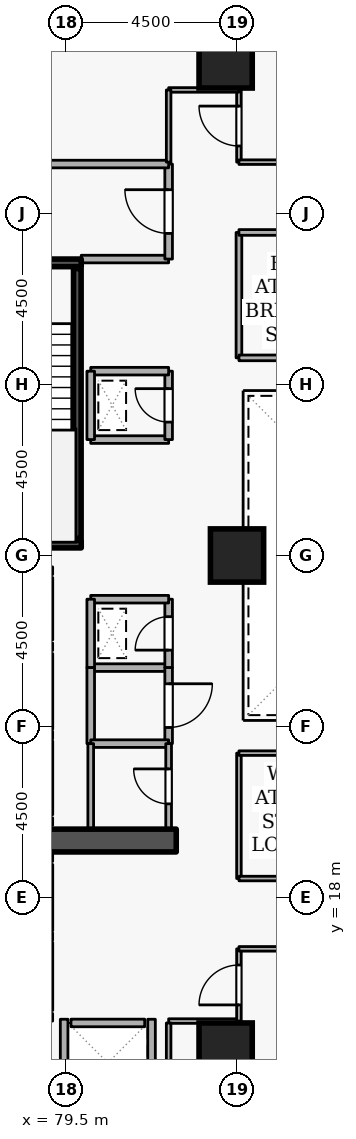
"""IFC4 building model, lengths in metres.
Left out: names, types, materials, properties, quantities, classifications, styles, units other than length and angle.
Written with IfcOpenShell. Run it as: python <this file> out.ifc"""

import sys

from ifc_helpers import new_model, si_unit, direction, frame, frame_2d, origin, origin_2d, place, context, subcontext, project, spatial, rectangle, extrude, element, fill, save


model = new_model("IFC4")
c1 = context("Model", 3, precision=1e-05, world=origin(), true_north=direction((0.0, 1.0)))
c2 = subcontext(c1, "Body", "Model", "MODEL_VIEW")
j1 = project(units=[si_unit("LENGTHUNIT", "METRE"), si_unit("PLANEANGLEUNIT", "RADIAN")], contexts=[c1])
p1 = place(None, origin())
s1 = spatial("IfcSite", under=j1, at=p1, CompositionType="ELEMENT")
p2 = place(p1, origin())
s2 = spatial("IfcBuilding", under=s1, at=p2, CompositionType="ELEMENT")
p3 = place(p2, frame((0.0, 0.0, 38.7)))
s3 = spatial("IfcBuildingStorey", under=s2, at=p3, CompositionType="ELEMENT", Elevation=38.7)
p4 = place(p3, frame((76.7, 19.5, 0.0), z_axis=(0.0, 0.0, 1.0), x_axis=(1.0, 0.0, 0.0)))
e1 = element("IfcWall", 1, at=p4, inside=s3, PredefinedType="SHEAR", context=c2, shape_type="SweptSolid", body=[
    extrude(rectangle(XDim=5.7, YDim=0.6, at=frame_2d((2.85, 0.0))), origin(), (0.0, 0.0, 1.0), 3.6),
])
for number, where, z_axis, x_axis in (
    (2, (83.7, 14.0, 0.0), (0.0, 0.0, 1.0), (1.0, 0.0, 0.0)),
    (3, (83.7, 40.0, 0.0), (0.0, 0.0, 1.0), (1.0, 0.0, 0.0)),
    (4, (84.0, 27.0, 0.0), (0.0, 0.0, 1.0), (1.0, 0.0, 0.0)),
):
    element("IfcColumn", number, at=place(p3, frame(where, z_axis=z_axis, x_axis=x_axis)), inside=s3, PredefinedType="COLUMN", context=c2, shape_type="SweptSolid", body=[
        extrude(rectangle(XDim=1.4, YDim=1.4, at=origin_2d()), origin(), (0.0, 0.0, 1.0), 3.6),
    ])
p5 = place(p3, frame((79.05, 24.78, 0.0), z_axis=(0.0, 0.0, 1.0), x_axis=(0.0, 1.0, 0.0)))
e5 = element("IfcWall", 5, at=p5, inside=s3, PredefinedType="STANDARD", context=c2, shape_type="SweptSolid", body=[
    extrude(rectangle(XDim=1.64, YDim=0.2, at=frame_2d((0.82, 0.0))), origin(), (0.0, 0.0, 1.0), 3.34),
])
p6 = place(p5, frame((0.31, 0.0, 0.0)))
e6 = element("IfcOpeningElement", 6, at=p6, cuts=e5, PredefinedType="OPENING", context=c2, shape_type="SweptSolid", body=[
    extrude(rectangle(XDim=1.02, YDim=2.06, at=frame_2d((0.51, 1.03))), frame((0.0, 0.11, 0.0), z_axis=(0.0, -1.0, 0.0), x_axis=(1.0, 0.0, 0.0)), (0.0, 0.0, 1.0), 0.22),
])
p7 = place(p3, frame((79.05, 22.43, 0.0), z_axis=(0.0, 0.0, 1.0), x_axis=(0.0, 1.0, 0.0)))
e7 = element("IfcWall", 7, at=p7, inside=s3, PredefinedType="STANDARD", context=c2, shape_type="SweptSolid", body=[
    extrude(rectangle(XDim=1.99, YDim=0.2, at=frame_2d((0.995, 0.0))), origin(), (0.0, 0.0, 1.0), 3.34),
])
p8 = place(p3, frame((79.05, 20.18, 0.0), z_axis=(0.0, 0.0, 1.0), x_axis=(0.0, 1.0, 0.0)))
e8 = element("IfcWall", 8, at=p8, inside=s3, PredefinedType="STANDARD", context=c2, shape_type="SweptSolid", body=[
    extrude(rectangle(XDim=1.94, YDim=0.2, at=frame_2d((0.97, 0.0))), origin(), (0.0, 0.0, 1.0), 3.34),
])
p9 = place(p3, frame((79.05, 17.13, 0.0), z_axis=(0.0, 0.0, 1.0), x_axis=(0.0, 1.0, 0.0)))
e9 = element("IfcWall", 9, at=p9, inside=s3, PredefinedType="STANDARD", context=c2, shape_type="SweptSolid", body=[
    extrude(rectangle(XDim=1.74, YDim=0.2, at=frame_2d((0.87, 0.0))), origin(), (0.0, 0.0, 1.0), 3.34),
])
p10 = place(p3, frame((79.05, 15.03, 0.0), z_axis=(0.0, 0.0, 1.0), x_axis=(0.0, 1.0, 0.0)))
e10 = element("IfcWall", 10, at=p10, inside=s3, PredefinedType="STANDARD", context=c2, shape_type="SweptSolid", body=[
    extrude(rectangle(XDim=1.79, YDim=0.2, at=frame_2d((0.895, 0.0))), origin(), (0.0, 0.0, 1.0), 3.34),
])
p11 = place(p3, frame((79.63, 14.7, 0.0), z_axis=(0.0, 0.0, 1.0), x_axis=(1.0, 0.0, 0.0)))
e11 = element("IfcWall", 11, at=p11, inside=s3, PredefinedType="STANDARD", context=c2, shape_type="SweptSolid", body=[
    extrude(rectangle(XDim=1.94, YDim=0.2, at=frame_2d((0.97, 0.0))), origin(), (0.0, 0.0, 1.0), 3.34),
])
for number, where, z_axis, x_axis in (
    (12, (81.75, 12.612, 0.0), (0.0, 0.0, 1.0), (0.0, 1.0, 0.0)),
    (13, (79.45, 12.612, 0.0), (0.0, 0.0, 1.0), (0.0, 1.0, 0.0)),
):
    element("IfcWall", number, at=place(p3, frame(where, z_axis=z_axis, x_axis=x_axis)), inside=s3, PredefinedType="STANDARD", context=c2, shape_type="SweptSolid", body=[
        extrude(rectangle(XDim=2.186, YDim=0.2, at=frame_2d((1.093, 0.0))), origin(), (0.0, 0.0, 1.0), 3.34),
    ])
p12 = place(p3, frame((76.55, 34.7, 0.0), z_axis=(0.0, 0.0, 1.0), x_axis=(1.0, 0.0, 0.0)))
e14 = element("IfcWall", 14, at=p12, inside=s3, PredefinedType="SHEAR", context=c2, shape_type="SweptSolid", body=[
    extrude(rectangle(XDim=3.35, YDim=0.2, at=frame_2d((1.675, 0.0))), origin(), (0.0, 0.0, 1.0), 3.6),
])
p13 = place(p12, frame((1.125, 0.0, 0.0)))
e15 = element("IfcOpeningElement", 15, at=p13, cuts=e14, PredefinedType="OPENING", context=c2, shape_type="SweptSolid", body=[
    extrude(rectangle(XDim=1.1, YDim=2.1, at=frame_2d((0.55, 1.05))), frame((0.0, 0.11, 0.0), z_axis=(0.0, -1.0, 0.0), x_axis=(1.0, 0.0, 0.0)), (0.0, 0.0, 1.0), 0.22),
])
p14 = place(p3, frame((79.9, 27.3, 0.0), z_axis=(0.0, 0.0, 1.0), x_axis=(-1.0, 0.0, 0.0)))
e16 = element("IfcWall", 16, at=p14, inside=s3, PredefinedType="SHEAR", context=c2, shape_type="SweptSolid", body=[
    extrude(rectangle(XDim=3.35, YDim=0.2, at=frame_2d((1.675, 0.0))), origin(), (0.0, 0.0, 1.0), 3.6),
])
p15 = place(p3, frame((79.797, 27.45, 0.0), z_axis=(0.0, 0.0, 1.0), x_axis=(0.0, 1.0, 0.0)))
e17 = element("IfcWall", 17, at=p15, inside=s3, PredefinedType="SHEAR", context=c2, shape_type="SweptSolid", body=[
    extrude(rectangle(XDim=7.1, YDim=0.2, at=frame_2d((3.55, 0.0))), origin(), (0.0, 0.0, 1.0), 3.6),
])
p16 = place(p3, frame((79.9, 34.8, 0.0), z_axis=(0.0, 0.0, 1.0), x_axis=(1.0, 0.0, 0.0)))
e18 = element("IfcWall", 18, at=p16, inside=s3, PredefinedType="STANDARD", context=c2, shape_type="SweptSolid", body=[
    extrude(rectangle(XDim=2.3, YDim=0.2, at=frame_2d((1.15, 0.0))), origin(), (0.0, 0.0, 1.0), 2.545),
])
p17 = place(p3, frame((82.2, 34.8, 0.0), z_axis=(0.0, 0.0, 1.0), x_axis=(0.0, 1.0, 0.0)))
e19 = element("IfcWall", 19, at=p17, inside=s3, PredefinedType="STANDARD", context=c2, shape_type="SweptSolid", body=[
    extrude(rectangle(XDim=2.5, YDim=0.2, at=frame_2d((1.25, 0.0))), origin(), (0.0, 0.0, 1.0), 3.34),
])
p18 = place(p17, frame((0.675, 0.0, 0.0)))
e20 = element("IfcOpeningElement", 20, at=p18, cuts=e19, PredefinedType="OPENING", context=c2, shape_type="SweptSolid", body=[
    extrude(rectangle(XDim=1.15, YDim=2.1, at=frame_2d((0.575, 1.05))), frame((0.0, 0.11, 0.0), z_axis=(0.0, -1.0, 0.0), x_axis=(1.0, 0.0, 0.0)), (0.0, 0.0, 1.0), 0.22),
])
p19 = place(p3, frame((82.2, 37.3, 0.0), z_axis=(0.0, 0.0, 1.0), x_axis=(-1.0, 0.0, 0.0)))
e21 = element("IfcWall", 21, at=p19, inside=s3, PredefinedType="STANDARD", context=c2, shape_type="SweptSolid", body=[
    extrude(rectangle(XDim=5.7, YDim=0.2, at=frame_2d((2.85, 0.0))), origin(), (0.0, 0.0, 1.0), 3.34),
])
p20 = place(p3, frame((80.15, 24.05, 0.0), z_axis=(0.0, 0.0, 1.0), x_axis=(1.0, 0.0, 0.0)))
e22 = element("IfcWall", 22, at=p20, inside=s3, PredefinedType="STANDARD", context=c2, shape_type="SweptSolid", body=[
    extrude(rectangle(XDim=2.05, YDim=0.2, at=frame_2d((1.025, 0.0))), origin(), (0.0, 0.0, 1.0), 3.34),
])
p21 = place(p3, frame((82.2, 24.05, 0.0), z_axis=(0.0, 0.0, 1.0), x_axis=(0.0, 1.0, 0.0)))
e23 = element("IfcWall", 23, at=p21, inside=s3, PredefinedType="STANDARD", context=c2, shape_type="SweptSolid", body=[
    extrude(rectangle(XDim=1.8, YDim=0.2, at=frame_2d((0.9, 0.0))), origin(), (0.0, 0.0, 1.0), 3.34),
])
p22 = place(p21, frame((0.46, 0.0, 0.0)))
e24 = element("IfcOpeningElement", 24, at=p22, cuts=e23, PredefinedType="OPENING", context=c2, shape_type="SweptSolid", body=[
    extrude(rectangle(XDim=0.88, YDim=2.04, at=frame_2d((0.44, 1.02))), frame((0.0, 0.11, 0.0), z_axis=(0.0, -1.0, 0.0), x_axis=(1.0, 0.0, 0.0)), (0.0, 0.0, 1.0), 0.22),
])
p23 = place(p3, frame((82.2, 25.85, 0.0), z_axis=(0.0, 0.0, 1.0), x_axis=(-1.0, 0.0, 0.0)))
e25 = element("IfcWall", 25, at=p23, inside=s3, PredefinedType="STANDARD", context=c2, shape_type="SweptSolid", body=[
    extrude(rectangle(XDim=2.05, YDim=0.2, at=frame_2d((1.025, 0.0))), origin(), (0.0, 0.0, 1.0), 3.34),
])
p24 = place(p3, frame((80.15, 25.85, 0.0), z_axis=(0.0, 0.0, 1.0), x_axis=(0.0, -1.0, 0.0)))
e26 = element("IfcWall", 26, at=p24, inside=s3, PredefinedType="STANDARD", context=c2, shape_type="SweptSolid", body=[
    extrude(rectangle(XDim=1.8, YDim=0.2, at=frame_2d((0.9, 0.0))), origin(), (0.0, 0.0, 1.0), 3.34),
])
p25 = place(p3, frame((80.15, 30.05, 0.0), z_axis=(0.0, 0.0, 1.0), x_axis=(1.0, 0.0, 0.0)))
e27 = element("IfcWall", 27, at=p25, inside=s3, PredefinedType="STANDARD", context=c2, shape_type="SweptSolid", body=[
    extrude(rectangle(XDim=2.05, YDim=0.2, at=frame_2d((1.025, 0.0))), origin(), (0.0, 0.0, 1.0), 3.34),
])
p26 = place(p3, frame((82.2, 30.05, 0.0), z_axis=(0.0, 0.0, 1.0), x_axis=(0.0, 1.0, 0.0)))
e28 = element("IfcWall", 28, at=p26, inside=s3, PredefinedType="STANDARD", context=c2, shape_type="SweptSolid", body=[
    extrude(rectangle(XDim=1.8, YDim=0.2, at=frame_2d((0.9, 0.0))), origin(), (0.0, 0.0, 1.0), 3.34),
])
p27 = place(p26, frame((0.46, 0.0, 0.0)))
e29 = element("IfcOpeningElement", 29, at=p27, cuts=e28, PredefinedType="OPENING", context=c2, shape_type="SweptSolid", body=[
    extrude(rectangle(XDim=0.88, YDim=2.04, at=frame_2d((0.44, 1.02))), frame((0.0, 0.11, 0.0), z_axis=(0.0, -1.0, 0.0), x_axis=(1.0, 0.0, 0.0)), (0.0, 0.0, 1.0), 0.22),
])
p28 = place(p3, frame((82.2, 31.85, 0.0), z_axis=(0.0, 0.0, 1.0), x_axis=(-1.0, 0.0, 0.0)))
e30 = element("IfcWall", 30, at=p28, inside=s3, PredefinedType="STANDARD", context=c2, shape_type="SweptSolid", body=[
    extrude(rectangle(XDim=2.05, YDim=0.2, at=frame_2d((1.025, 0.0))), origin(), (0.0, 0.0, 1.0), 3.34),
])
p29 = place(p3, frame((80.15, 31.85, 0.0), z_axis=(0.0, 0.0, 1.0), x_axis=(0.0, -1.0, 0.0)))
e31 = element("IfcWall", 31, at=p29, inside=s3, PredefinedType="STANDARD", context=c2, shape_type="SweptSolid", body=[
    extrude(rectangle(XDim=1.8, YDim=0.2, at=frame_2d((0.9, 0.0))), origin(), (0.0, 0.0, 1.0), 3.34),
])
p30 = place(p3, frame((80.15, 22.05, 0.0), z_axis=(0.0, 0.0, 1.0), x_axis=(0.0, 1.0, 0.0)))
e32 = element("IfcWall", 32, at=p30, inside=s3, PredefinedType="STANDARD", context=c2, shape_type="SweptSolid", body=[
    extrude(rectangle(XDim=2.0, YDim=0.2, at=frame_2d((1.0, 0.0))), origin(), (0.0, 0.0, 1.0), 3.34),
])
p31 = place(p3, frame((82.2, 24.05, 0.0), z_axis=(0.0, 0.0, 1.0), x_axis=(0.0, -1.0, 0.0)))
e33 = element("IfcWall", 33, at=p31, inside=s3, PredefinedType="STANDARD", context=c2, shape_type="SweptSolid", body=[
    extrude(rectangle(XDim=2.0, YDim=0.2, at=frame_2d((1.0, 0.0))), origin(), (0.0, 0.0, 1.0), 3.34),
])
p32 = place(p31, frame((0.425, 0.0, 0.0)))
e34 = element("IfcOpeningElement", 34, at=p32, cuts=e33, PredefinedType="OPENING", context=c2, shape_type="SweptSolid", body=[
    extrude(rectangle(XDim=1.15, YDim=2.1, at=frame_2d((0.575, 1.05))), frame((0.0, 0.11, 0.0), z_axis=(0.0, -1.0, 0.0), x_axis=(1.0, 0.0, 0.0)), (0.0, 0.0, 1.0), 0.22),
])
p33 = place(p3, frame((82.2, 22.05, 0.0), z_axis=(0.0, 0.0, 1.0), x_axis=(-1.0, 0.0, 0.0)))
e35 = element("IfcWall", 35, at=p33, inside=s3, PredefinedType="STANDARD", context=c2, shape_type="SweptSolid", body=[
    extrude(rectangle(XDim=2.05, YDim=0.2, at=frame_2d((1.025, 0.0))), origin(), (0.0, 0.0, 1.0), 3.34),
])
p34 = place(p3, frame((82.2, 19.8, 0.0), z_axis=(0.0, 0.0, 1.0), x_axis=(0.0, 1.0, 0.0)))
e36 = element("IfcWall", 36, at=p34, inside=s3, PredefinedType="PARTITIONING", context=c2, shape_type="SweptSolid", body=[
    extrude(rectangle(XDim=2.25, YDim=0.15, at=frame_2d((1.125, 0.0))), origin(), (0.0, 0.0, 1.0), 3.34),
])
p35 = place(p34, frame((0.665, 0.0, 0.0)))
e37 = element("IfcOpeningElement", 37, at=p35, cuts=e36, PredefinedType="OPENING", context=c2, shape_type="SweptSolid", body=[
    extrude(rectangle(XDim=0.92, YDim=2.08, at=frame_2d((0.46, 1.04))), frame((0.0, 0.085, 0.0), z_axis=(0.0, -1.0, 0.0), x_axis=(1.0, 0.0, 0.0)), (0.0, 0.0, 1.0), 0.17),
])
p36 = place(p3, frame((80.15, 22.05, 0.0), z_axis=(0.0, 0.0, 1.0), x_axis=(0.0, -1.0, 0.0)))
e38 = element("IfcWall", 38, at=p36, inside=s3, PredefinedType="PARTITIONING", context=c2, shape_type="SweptSolid", body=[
    extrude(rectangle(XDim=2.25, YDim=0.15, at=frame_2d((1.125, 0.0))), origin(), (0.0, 0.0, 1.0), 3.34),
])
p37 = place(p3, frame((82.2, 14.75, 0.0), z_axis=(0.0, 0.0, 1.0), x_axis=(1.0, 0.0, 0.0)))
e39 = element("IfcWall", 39, at=p37, inside=s3, PredefinedType="PARTITIONING", context=c2, shape_type="SweptSolid", body=[
    extrude(rectangle(XDim=1.85, YDim=0.12, at=frame_2d((0.925, 0.0))), origin(), (0.0, 0.0, 1.0), 3.34),
])
p38 = place(p3, frame((84.05, 14.75, 0.0), z_axis=(0.0, 0.0, 1.0), x_axis=(0.0, 1.0, 0.0)))
e40 = element("IfcWall", 40, at=p38, inside=s3, PredefinedType="PARTITIONING", context=c2, shape_type="SweptSolid", body=[
    extrude(rectangle(XDim=1.9, YDim=0.12, at=frame_2d((0.95, 0.0))), origin(), (0.0, 0.0, 1.0), 3.34),
])
p39 = place(p38, frame((0.425, 0.0, 0.0)))
e41 = element("IfcOpeningElement", 41, at=p39, cuts=e40, PredefinedType="OPENING", context=c2, shape_type="SweptSolid", body=[
    extrude(rectangle(XDim=1.05, YDim=2.1, at=frame_2d((0.525, 1.05))), frame((0.0, 0.07, 0.0), z_axis=(0.0, -1.0, 0.0), x_axis=(1.0, 0.0, 0.0)), (0.0, 0.0, 1.0), 0.14),
])
p40 = place(p3, frame((84.05, 16.65, 0.0), z_axis=(0.0, 0.0, 1.0), x_axis=(1.0, 0.0, 0.0)))
e42 = element("IfcWall", 42, at=p40, inside=s3, PredefinedType="PARTITIONING", context=c2, shape_type="SweptSolid", body=[
    extrude(rectangle(XDim=1.3, YDim=0.12, at=frame_2d((0.65, 0.0))), origin(), (0.0, 0.0, 1.0), 3.34),
])
p41 = place(p3, frame((82.2, 12.4, 0.0), z_axis=(0.0, 0.0, 1.0), x_axis=(0.0, 1.0, 0.0)))
e43 = element("IfcWall", 43, at=p41, inside=s3, PredefinedType="PARTITIONING", context=c2, shape_type="SweptSolid", body=[
    extrude(rectangle(XDim=2.3, YDim=0.12, at=frame_2d((1.15, 0.0))), origin(), (0.0, 0.0, 1.0), 3.34),
])
p42 = place(p3, frame((84.05, 37.35, 0.0), z_axis=(0.0, 0.0, 1.0), x_axis=(0.0, 1.0, 0.0)))
e44 = element("IfcWall", 44, at=p42, inside=s3, PredefinedType="PARTITIONING", context=c2, shape_type="SweptSolid", body=[
    extrude(rectangle(XDim=1.9, YDim=0.12, at=frame_2d((0.95, 0.0))), origin(), (0.0, 0.0, 1.0), 3.34),
])
p43 = place(p42, frame((0.425, 0.0, 0.0)))
e45 = element("IfcOpeningElement", 45, at=p43, cuts=e44, PredefinedType="OPENING", context=c2, shape_type="SweptSolid", body=[
    extrude(rectangle(XDim=1.05, YDim=2.1, at=frame_2d((0.525, 1.05))), frame((0.0, 0.07, 0.0), z_axis=(0.0, -1.0, 0.0), x_axis=(1.0, 0.0, 0.0)), (0.0, 0.0, 1.0), 0.14),
])
p44 = place(p3, frame((84.05, 39.25, 0.0), z_axis=(0.0, 0.0, 1.0), x_axis=(-1.0, 0.0, 0.0)))
e46 = element("IfcWall", 46, at=p44, inside=s3, PredefinedType="PARTITIONING", context=c2, shape_type="SweptSolid", body=[
    extrude(rectangle(XDim=1.85, YDim=0.12, at=frame_2d((0.925, 0.0))), origin(), (0.0, 0.0, 1.0), 3.34),
])
p45 = place(p3, frame((82.2, 39.25, 0.0), z_axis=(0.0, 0.0, 1.0), x_axis=(0.0, -1.0, 0.0)))
e47 = element("IfcWall", 47, at=p45, inside=s3, PredefinedType="PARTITIONING", context=c2, shape_type="SweptSolid", body=[
    extrude(rectangle(XDim=1.9, YDim=0.12, at=frame_2d((0.95, 0.0))), origin(), (0.0, 0.0, 1.0), 3.34),
])
p46 = place(p3, frame((85.35, 37.35, 0.0), z_axis=(0.0, 0.0, 1.0), x_axis=(-1.0, 0.0, 0.0)))
e48 = element("IfcWall", 48, at=p46, inside=s3, PredefinedType="PARTITIONING", context=c2, shape_type="SweptSolid", body=[
    extrude(rectangle(XDim=1.3, YDim=0.12, at=frame_2d((0.65, 0.0))), origin(), (0.0, 0.0, 1.0), 3.34),
])
p47 = place(p3, frame((84.05, 32.2, 0.0), z_axis=(0.0, 0.0, 1.0), x_axis=(0.0, 1.0, 0.0)))
e49 = element("IfcWall", 49, at=p47, inside=s3, PredefinedType="PARTITIONING", context=c2, shape_type="SweptSolid", body=[
    extrude(rectangle(XDim=3.3, YDim=0.15, at=frame_2d((1.65, 0.0))), origin(), (0.0, 0.0, 1.0), 3.34),
])
p48 = place(p3, frame((84.05, 35.5, 0.0), z_axis=(0.0, 0.0, 1.0), x_axis=(1.0, 0.0, 0.0)))
e50 = element("IfcWall", 50, at=p48, inside=s3, PredefinedType="PARTITIONING", context=c2, shape_type="SweptSolid", body=[
    extrude(rectangle(XDim=8.9, YDim=0.15, at=frame_2d((4.45, 0.0))), origin(), (0.0, 0.0, 1.0), 3.34),
])
p49 = place(p48, frame((3.8, 0.0, 0.0)))
e51 = element("IfcOpeningElement", 51, at=p49, cuts=e50, PredefinedType="OPENING", context=c2, shape_type="SweptSolid", body=[
    extrude(rectangle(XDim=1.3, YDim=2.12, at=frame_2d((0.65, 1.06))), frame((0.0, 0.085, 0.0), z_axis=(0.0, -1.0, 0.0), x_axis=(1.0, 0.0, 0.0)), (0.0, 0.0, 1.0), 0.17),
])
p50 = place(p3, frame((92.95, 32.2, 0.0), z_axis=(0.0, 0.0, 1.0), x_axis=(-1.0, 0.0, 0.0)))
e52 = element("IfcWall", 52, at=p50, inside=s3, PredefinedType="PARTITIONING", context=c2, shape_type="SweptSolid", body=[
    extrude(rectangle(XDim=8.9, YDim=0.15, at=frame_2d((4.45, 0.0))), origin(), (0.0, 0.0, 1.0), 3.34),
])
p51 = place(p3, frame((84.05, 18.5, 0.0), z_axis=(0.0, 0.0, 1.0), x_axis=(0.0, 1.0, 0.0)))
e53 = element("IfcWall", 53, at=p51, inside=s3, PredefinedType="PARTITIONING", context=c2, shape_type="SweptSolid", body=[
    extrude(rectangle(XDim=3.3, YDim=0.12, at=frame_2d((1.65, 0.0))), origin(), (0.0, 0.0, 1.0), 3.34),
])
p52 = place(p3, frame((84.05, 21.8, 0.0), z_axis=(0.0, 0.0, 1.0), x_axis=(1.0, 0.0, 0.0)))
e54 = element("IfcWall", 54, at=p52, inside=s3, PredefinedType="PARTITIONING", context=c2, shape_type="SweptSolid", body=[
    extrude(rectangle(XDim=8.9, YDim=0.12, at=frame_2d((4.45, 0.0))), origin(), (0.0, 0.0, 1.0), 3.34),
])
p53 = place(p3, frame((92.95, 18.5, 0.0), z_axis=(0.0, 0.0, 1.0), x_axis=(-1.0, 0.0, 0.0)))
e55 = element("IfcWall", 55, at=p53, inside=s3, PredefinedType="PARTITIONING", context=c2, shape_type="SweptSolid", body=[
    extrude(rectangle(XDim=8.9, YDim=0.12, at=frame_2d((4.45, 0.0))), origin(), (0.0, 0.0, 1.0), 3.34),
])
p54 = place(p53, frame((3.975, 0.0, 0.0)))
e56 = element("IfcOpeningElement", 56, at=p54, cuts=e55, PredefinedType="OPENING", context=c2, shape_type="SweptSolid", body=[
    extrude(rectangle(XDim=0.95, YDim=2.1, at=frame_2d((0.475, 1.05))), frame((0.0, 0.07, 0.0), z_axis=(0.0, -1.0, 0.0), x_axis=(1.0, 0.0, 0.0)), (0.0, 0.0, 1.0), 0.14),
])
p55 = place(p18, origin())
e57 = element("IfcDoor", 57, at=p55, inside=s3, OperationType="SINGLE_SWING_RIGHT", PredefinedType="DOOR", context=c2, shape_type="SweptSolid", body=[
    extrude(rectangle(XDim=1.15, YDim=2.1, at=frame_2d((0.575, 1.05))), frame((0.0, 0.025, 0.0), z_axis=(0.0, -1.0, 0.0), x_axis=(1.0, 0.0, 0.0)), (0.0, 0.0, 1.0), 0.05),
])
fill(e20, e57)
p56 = place(p22, origin())
e58 = element("IfcDoor", 58, at=p56, inside=s3, OperationType="SINGLE_SWING_LEFT", PredefinedType="DOOR", context=c2, shape_type="SweptSolid", body=[
    extrude(rectangle(XDim=0.88, YDim=2.04, at=frame_2d((0.44, 1.02))), frame((0.0, 0.025, 0.0), z_axis=(0.0, -1.0, 0.0), x_axis=(1.0, 0.0, 0.0)), (0.0, 0.0, 1.0), 0.05),
])
fill(e24, e58)
p57 = place(p27, origin())
e59 = element("IfcDoor", 59, at=p57, inside=s3, OperationType="SINGLE_SWING_RIGHT", PredefinedType="DOOR", context=c2, shape_type="SweptSolid", body=[
    extrude(rectangle(XDim=0.88, YDim=2.04, at=frame_2d((0.44, 1.02))), frame((0.0, 0.025, 0.0), z_axis=(0.0, -1.0, 0.0), x_axis=(1.0, 0.0, 0.0)), (0.0, 0.0, 1.0), 0.05),
])
fill(e29, e59)
p58 = place(p35, origin())
e60 = element("IfcDoor", 60, at=p58, inside=s3, OperationType="SINGLE_SWING_RIGHT", PredefinedType="DOOR", context=c2, shape_type="SweptSolid", body=[
    extrude(rectangle(XDim=0.92, YDim=2.08, at=frame_2d((0.46, 1.04))), frame((0.0, 0.025, 0.0), z_axis=(0.0, -1.0, 0.0), x_axis=(1.0, 0.0, 0.0)), (0.0, 0.0, 1.0), 0.05),
])
fill(e37, e60)
p59 = place(p32, origin())
e61 = element("IfcDoor", 61, at=p59, inside=s3, OperationType="SINGLE_SWING_LEFT", PredefinedType="DOOR", context=c2, shape_type="SweptSolid", body=[
    extrude(rectangle(XDim=1.15, YDim=2.1, at=frame_2d((0.575, 1.05))), frame((0.0, 0.025, 0.0), z_axis=(0.0, -1.0, 0.0), x_axis=(1.0, 0.0, 0.0)), (0.0, 0.0, 1.0), 0.05),
])
fill(e34, e61)
p60 = place(p39, origin())
e62 = element("IfcDoor", 62, at=p60, inside=s3, OperationType="SINGLE_SWING_LEFT", PredefinedType="DOOR", context=c2, shape_type="SweptSolid", body=[
    extrude(rectangle(XDim=1.05, YDim=2.1, at=frame_2d((0.525, 1.05))), frame((0.0, 0.025, 0.0), z_axis=(0.0, -1.0, 0.0), x_axis=(1.0, 0.0, 0.0)), (0.0, 0.0, 1.0), 0.05),
])
fill(e41, e62)
p61 = place(p43, origin())
e63 = element("IfcDoor", 63, at=p61, inside=s3, OperationType="SINGLE_SWING_RIGHT", PredefinedType="DOOR", context=c2, shape_type="SweptSolid", body=[
    extrude(rectangle(XDim=1.05, YDim=2.1, at=frame_2d((0.525, 1.05))), frame((0.0, 0.025, 0.0), z_axis=(0.0, -1.0, 0.0), x_axis=(1.0, 0.0, 0.0)), (0.0, 0.0, 1.0), 0.05),
])
fill(e45, e63)
save(model, sys.argv[1])
